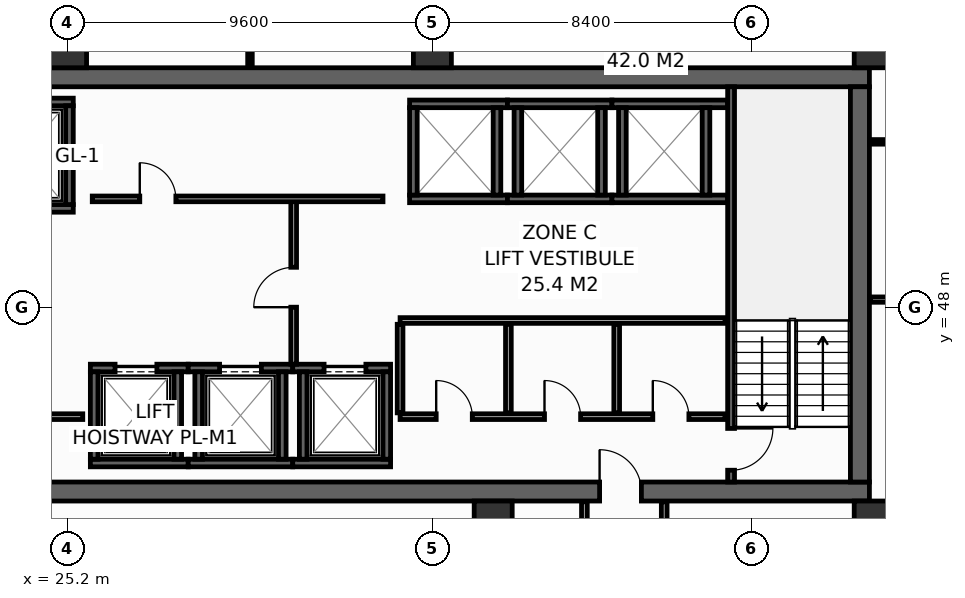
"""IFC4 building model, lengths in metres.
Left out: names, types, materials, properties, quantities, classifications, styles, units other than length and angle.
Written with IfcOpenShell. Run it as: python <this file> out.ifc"""

import sys

from ifc_helpers import new_model, si_unit, direction, frame, frame_2d, origin, origin_2d, place, context, subcontext, project, spatial, rectangle, hollow_rectangle, extrude, element, fill, save


model = new_model("IFC4")
c1 = context("Model", 3, precision=1e-05, world=origin(), true_north=direction((0.0, 1.0)))
c2 = subcontext(c1, "Body", "Model", "MODEL_VIEW")
j1 = project(units=[si_unit("LENGTHUNIT", "METRE"), si_unit("PLANEANGLEUNIT", "RADIAN")], contexts=[c1])
p1 = place(None, origin())
s1 = spatial("IfcSite", under=j1, at=p1, CompositionType="ELEMENT")
p2 = place(p1, origin())
s2 = spatial("IfcBuilding", under=s1, at=p2, CompositionType="ELEMENT")
p3 = place(p2, frame((0.0, 0.0, 175.2)))
s3 = spatial("IfcBuildingStorey", under=s2, at=p3, CompositionType="ELEMENT", Elevation=175.2)
p4 = place(p3, frame((13.6, 43.15, 0.0), z_axis=(0.0, 0.0, 1.0), x_axis=(1.0, 0.0, 0.0)))
e1 = element("IfcWall", 1, at=p4, inside=s3, PredefinedType="SHEAR", context=c2, shape_type="SweptSolid", body=[
    extrude(rectangle(XDim=32.7, YDim=0.5, at=frame_2d((16.35, 0.0))), origin(), (0.0, 0.0, 1.0), 3.55),
])
p5 = place(p4, frame((5.4, 0.0, 0.0)))
e2 = element("IfcOpeningElement", 2, at=p5, cuts=e1, PredefinedType="OPENING", context=c2, shape_type="SweptSolid", body=[
    extrude(rectangle(XDim=1.1, YDim=2.15, at=frame_2d((0.55, 1.075))), frame((0.0, 0.26, 0.0), z_axis=(0.0, -1.0, 0.0), x_axis=(1.0, 0.0, 0.0)), (0.0, 0.0, 1.0), 0.52),
])
p6 = place(p4, frame((25.6, 0.0, 0.0)))
e3 = element("IfcOpeningElement", 3, at=p6, cuts=e1, PredefinedType="OPENING", context=c2, shape_type="SweptSolid", body=[
    extrude(rectangle(XDim=1.1, YDim=2.15, at=frame_2d((0.55, 1.075))), frame((0.0, 0.26, 0.0), z_axis=(0.0, -1.0, 0.0), x_axis=(1.0, 0.0, 0.0)), (0.0, 0.0, 1.0), 0.52),
])
p7 = place(p3, frame((13.6, 54.05, 0.0), z_axis=(0.0, 0.0, 1.0), x_axis=(1.0, 0.0, 0.0)))
e4 = element("IfcWall", 4, at=p7, inside=s3, PredefinedType="SHEAR", context=c2, shape_type="SweptSolid", body=[
    extrude(rectangle(XDim=32.7, YDim=0.5, at=frame_2d((16.35, 0.0))), origin(), (0.0, 0.0, 1.0), 3.55),
])
p8 = place(p3, frame((46.05, 43.4, 0.0), z_axis=(0.0, 0.0, 1.0), x_axis=(0.0, 1.0, 0.0)))
e5 = element("IfcWall", 5, at=p8, inside=s3, PredefinedType="SHEAR", context=c2, shape_type="SweptSolid", body=[
    extrude(rectangle(XDim=10.4, YDim=0.5, at=frame_2d((5.2, 0.0))), origin(), (0.0, 0.0, 1.0), 3.55),
])
for number, where, z_axis, x_axis in (
    (6, (25.2, 54.8, 0.0), (0.0, 0.0, 1.0), (1.0, 0.0, 0.0)),
    (7, (34.8, 54.8, 0.0), (0.0, 0.0, 1.0), (1.0, 0.0, 0.0)),
    (8, (46.4, 54.8, 0.0), (0.0, 0.0, 1.0), (1.0, 0.0, 0.0)),
    (9, (36.4, 42.4, 0.0), (0.0, 0.0, 1.0), (1.0, 0.0, 0.0)),
    (10, (46.4, 42.4, 0.0), (0.0, 0.0, 1.0), (1.0, 0.0, 0.0)),
):
    element("IfcColumn", number, at=place(p3, frame(where, z_axis=z_axis, x_axis=x_axis)), inside=s3, PredefinedType="COLUMN", context=c2, shape_type="SweptSolid", body=[
        extrude(hollow_rectangle(XDim=1.0, YDim=1.0, WallThickness=0.045, at=origin_2d()), origin(), (0.0, 0.0, 1.0), 3.8),
    ])
p9 = place(p3, frame((22.5, 50.6, 0.0), z_axis=(0.0, 0.0, 1.0), x_axis=(1.0, 0.0, 0.0)))
e11 = element("IfcWall", 11, at=p9, inside=s3, PredefinedType="SHEAR", context=c2, shape_type="SweptSolid", body=[
    extrude(rectangle(XDim=2.85, YDim=0.2, at=frame_2d((1.425, 0.0))), origin(), (0.0, 0.0, 1.0), 3.55),
])
p10 = place(p9, frame((0.925, 0.0, 0.0)))
e12 = element("IfcOpeningElement", 12, at=p10, cuts=e11, PredefinedType="OPENING", context=c2, shape_type="SweptSolid", body=[
    extrude(rectangle(XDim=1.25, YDim=2.3, at=frame_2d((0.625, 1.15))), frame((0.0, 0.11, 0.0), z_axis=(0.0, -1.0, 0.0), x_axis=(1.0, 0.0, 0.0)), (0.0, 0.0, 1.0), 0.22),
])
p11 = place(p3, frame((22.5, 53.4, 0.0), z_axis=(0.0, 0.0, 1.0), x_axis=(1.0, 0.0, 0.0)))
e13 = element("IfcWall", 13, at=p11, inside=s3, PredefinedType="SHEAR", context=c2, shape_type="SweptSolid", body=[
    extrude(rectangle(XDim=2.85, YDim=0.2, at=frame_2d((1.425, 0.0))), origin(), (0.0, 0.0, 1.0), 3.55),
])
p12 = place(p3, frame((25.25, 50.7, 0.0), z_axis=(0.0, 0.0, 1.0), x_axis=(0.0, 1.0, 0.0)))
e14 = element("IfcWall", 14, at=p12, inside=s3, PredefinedType="SHEAR", context=c2, shape_type="SweptSolid", body=[
    extrude(rectangle(XDim=2.6, YDim=0.2, at=frame_2d((1.3, 0.0))), origin(), (0.0, 0.0, 1.0), 3.55),
])
p13 = place(p3, frame((25.8, 43.9, 0.0), z_axis=(0.0, 0.0, 1.0), x_axis=(1.0, 0.0, 0.0)))
e15 = element("IfcWall", 15, at=p13, inside=s3, PredefinedType="SHEAR", context=c2, shape_type="SweptSolid", body=[
    extrude(rectangle(XDim=2.575, YDim=0.2, at=frame_2d((1.288, 0.0))), origin(), (0.0, 0.0, 1.0), 3.55),
])
p14 = place(p3, frame((25.8, 46.4, 0.0), z_axis=(0.0, 0.0, 1.0), x_axis=(1.0, 0.0, 0.0)))
e16 = element("IfcWall", 16, at=p14, inside=s3, PredefinedType="SHEAR", context=c2, shape_type="SweptSolid", body=[
    extrude(rectangle(XDim=2.575, YDim=0.2, at=frame_2d((1.288, 0.0))), origin(), (0.0, 0.0, 1.0), 3.55),
])
p15 = place(p14, frame((0.65, 0.0, 0.0)))
e17 = element("IfcOpeningElement", 17, at=p15, cuts=e16, PredefinedType="OPENING", context=c2, shape_type="SweptSolid", body=[
    extrude(rectangle(XDim=1.1, YDim=2.2, at=frame_2d((0.55, 1.1))), frame((0.0, 0.11, 0.0), z_axis=(0.0, -1.0, 0.0), x_axis=(1.0, 0.0, 0.0)), (0.0, 0.0, 1.0), 0.22),
])
for number, where, z_axis, x_axis in (
    (18, (25.9, 44.0, 0.0), (0.0, 0.0, 1.0), (0.0, 1.0, 0.0)),
    (19, (28.1, 44.0, 0.0), (0.0, 0.0, 1.0), (0.0, 1.0, 0.0)),
):
    element("IfcWall", number, at=place(p3, frame(where, z_axis=z_axis, x_axis=x_axis)), inside=s3, PredefinedType="SHEAR", context=c2, shape_type="SweptSolid", body=[
        extrude(rectangle(XDim=2.3, YDim=0.2, at=frame_2d((1.15, 0.0))), origin(), (0.0, 0.0, 1.0), 3.55),
    ])
p16 = place(p3, frame((28.375, 43.9, 0.0), z_axis=(0.0, 0.0, 1.0), x_axis=(1.0, 0.0, 0.0)))
e20 = element("IfcWall", 20, at=p16, inside=s3, PredefinedType="SHEAR", context=c2, shape_type="SweptSolid", body=[
    extrude(rectangle(XDim=2.75, YDim=0.2, at=frame_2d((1.375, 0.0))), origin(), (0.0, 0.0, 1.0), 3.55),
])
p17 = place(p3, frame((28.375, 46.4, 0.0), z_axis=(0.0, 0.0, 1.0), x_axis=(1.0, 0.0, 0.0)))
e21 = element("IfcWall", 21, at=p17, inside=s3, PredefinedType="SHEAR", context=c2, shape_type="SweptSolid", body=[
    extrude(rectangle(XDim=2.75, YDim=0.2, at=frame_2d((1.375, 0.0))), origin(), (0.0, 0.0, 1.0), 3.55),
])
p18 = place(p17, frame((0.825, 0.0, 0.0)))
e22 = element("IfcOpeningElement", 22, at=p18, cuts=e21, PredefinedType="OPENING", context=c2, shape_type="SweptSolid", body=[
    extrude(rectangle(XDim=1.1, YDim=2.2, at=frame_2d((0.55, 1.1))), frame((0.0, 0.11, 0.0), z_axis=(0.0, -1.0, 0.0), x_axis=(1.0, 0.0, 0.0)), (0.0, 0.0, 1.0), 0.22),
])
for number, where, z_axis, x_axis in (
    (23, (28.65, 44.0, 0.0), (0.0, 0.0, 1.0), (0.0, 1.0, 0.0)),
    (24, (30.85, 44.0, 0.0), (0.0, 0.0, 1.0), (0.0, 1.0, 0.0)),
):
    element("IfcWall", number, at=place(p3, frame(where, z_axis=z_axis, x_axis=x_axis)), inside=s3, PredefinedType="SHEAR", context=c2, shape_type="SweptSolid", body=[
        extrude(rectangle(XDim=2.3, YDim=0.2, at=frame_2d((1.15, 0.0))), origin(), (0.0, 0.0, 1.0), 3.55),
    ])
p19 = place(p3, frame((31.125, 43.9, 0.0), z_axis=(0.0, 0.0, 1.0), x_axis=(1.0, 0.0, 0.0)))
e25 = element("IfcWall", 25, at=p19, inside=s3, PredefinedType="SHEAR", context=c2, shape_type="SweptSolid", body=[
    extrude(rectangle(XDim=2.575, YDim=0.2, at=frame_2d((1.288, 0.0))), origin(), (0.0, 0.0, 1.0), 3.55),
])
p20 = place(p3, frame((31.125, 46.4, 0.0), z_axis=(0.0, 0.0, 1.0), x_axis=(1.0, 0.0, 0.0)))
e26 = element("IfcWall", 26, at=p20, inside=s3, PredefinedType="SHEAR", context=c2, shape_type="SweptSolid", body=[
    extrude(rectangle(XDim=2.575, YDim=0.2, at=frame_2d((1.288, 0.0))), origin(), (0.0, 0.0, 1.0), 3.55),
])
p21 = place(p20, frame((0.825, 0.0, 0.0)))
e27 = element("IfcOpeningElement", 27, at=p21, cuts=e26, PredefinedType="OPENING", context=c2, shape_type="SweptSolid", body=[
    extrude(rectangle(XDim=1.1, YDim=2.2, at=frame_2d((0.55, 1.1))), frame((0.0, 0.11, 0.0), z_axis=(0.0, -1.0, 0.0), x_axis=(1.0, 0.0, 0.0)), (0.0, 0.0, 1.0), 0.22),
])
for number, where, z_axis, x_axis in (
    (28, (31.4, 44.0, 0.0), (0.0, 0.0, 1.0), (0.0, 1.0, 0.0)),
    (29, (33.6, 44.0, 0.0), (0.0, 0.0, 1.0), (0.0, 1.0, 0.0)),
):
    element("IfcWall", number, at=place(p3, frame(where, z_axis=z_axis, x_axis=x_axis)), inside=s3, PredefinedType="SHEAR", context=c2, shape_type="SweptSolid", body=[
        extrude(rectangle(XDim=2.3, YDim=0.2, at=frame_2d((1.15, 0.0))), origin(), (0.0, 0.0, 1.0), 3.55),
    ])
for number, where, z_axis, x_axis in (
    (30, (34.2, 50.85, 0.0), (0.0, 0.0, 1.0), (1.0, 0.0, 0.0)),
    (31, (34.2, 53.35, 0.0), (0.0, 0.0, 1.0), (1.0, 0.0, 0.0)),
):
    element("IfcWall", number, at=place(p3, frame(where, z_axis=z_axis, x_axis=x_axis)), inside=s3, PredefinedType="SHEAR", context=c2, shape_type="SweptSolid", body=[
        extrude(rectangle(XDim=2.575, YDim=0.2, at=frame_2d((1.288, 0.0))), origin(), (0.0, 0.0, 1.0), 3.55),
    ])
for number, where, z_axis, x_axis in (
    (32, (34.3, 50.95, 0.0), (0.0, 0.0, 1.0), (0.0, 1.0, 0.0)),
    (33, (36.5, 50.95, 0.0), (0.0, 0.0, 1.0), (0.0, 1.0, 0.0)),
):
    element("IfcWall", number, at=place(p3, frame(where, z_axis=z_axis, x_axis=x_axis)), inside=s3, PredefinedType="SHEAR", context=c2, shape_type="SweptSolid", body=[
        extrude(rectangle(XDim=2.3, YDim=0.2, at=frame_2d((1.15, 0.0))), origin(), (0.0, 0.0, 1.0), 3.55),
    ])
for number, where, z_axis, x_axis in (
    (34, (36.775, 50.85, 0.0), (0.0, 0.0, 1.0), (1.0, 0.0, 0.0)),
    (35, (36.775, 53.35, 0.0), (0.0, 0.0, 1.0), (1.0, 0.0, 0.0)),
):
    element("IfcWall", number, at=place(p3, frame(where, z_axis=z_axis, x_axis=x_axis)), inside=s3, PredefinedType="SHEAR", context=c2, shape_type="SweptSolid", body=[
        extrude(rectangle(XDim=2.75, YDim=0.2, at=frame_2d((1.375, 0.0))), origin(), (0.0, 0.0, 1.0), 3.55),
    ])
for number, where, z_axis, x_axis in (
    (36, (37.05, 50.95, 0.0), (0.0, 0.0, 1.0), (0.0, 1.0, 0.0)),
    (37, (39.25, 50.95, 0.0), (0.0, 0.0, 1.0), (0.0, 1.0, 0.0)),
):
    element("IfcWall", number, at=place(p3, frame(where, z_axis=z_axis, x_axis=x_axis)), inside=s3, PredefinedType="SHEAR", context=c2, shape_type="SweptSolid", body=[
        extrude(rectangle(XDim=2.3, YDim=0.2, at=frame_2d((1.15, 0.0))), origin(), (0.0, 0.0, 1.0), 3.55),
    ])
for number, where, z_axis, x_axis in (
    (38, (39.525, 50.85, 0.0), (0.0, 0.0, 1.0), (1.0, 0.0, 0.0)),
    (39, (39.525, 53.35, 0.0), (0.0, 0.0, 1.0), (1.0, 0.0, 0.0)),
):
    element("IfcWall", number, at=place(p3, frame(where, z_axis=z_axis, x_axis=x_axis)), inside=s3, PredefinedType="SHEAR", context=c2, shape_type="SweptSolid", body=[
        extrude(rectangle(XDim=3.045, YDim=0.2, at=frame_2d((1.522, 0.0))), origin(), (0.0, 0.0, 1.0), 3.55),
    ])
for number, where, z_axis, x_axis in (
    (40, (39.8, 50.95, 0.0), (0.0, 0.0, 1.0), (0.0, 1.0, 0.0)),
    (41, (42.0, 50.95, 0.0), (0.0, 0.0, 1.0), (0.0, 1.0, 0.0)),
):
    element("IfcWall", number, at=place(p3, frame(where, z_axis=z_axis, x_axis=x_axis)), inside=s3, PredefinedType="SHEAR", context=c2, shape_type="SweptSolid", body=[
        extrude(rectangle(XDim=2.3, YDim=0.2, at=frame_2d((1.15, 0.0))), origin(), (0.0, 0.0, 1.0), 3.55),
    ])
p22 = place(p3, frame((42.66, 53.8, 0.0), z_axis=(0.0, 0.0, 1.0), x_axis=(0.0, -1.0, 0.0)))
e42 = element("IfcWall", 42, at=p22, inside=s3, PredefinedType="SHEAR", context=c2, shape_type="SweptSolid", body=[
    extrude(rectangle(XDim=10.4, YDim=0.18, at=frame_2d((5.2, 0.0))), origin(), (0.0, 0.0, 1.0), 3.55),
])
p23 = place(p22, frame((8.99, 0.0, 0.0)))
e43 = element("IfcOpeningElement", 43, at=p23, cuts=e42, PredefinedType="OPENING", context=c2, shape_type="SweptSolid", body=[
    extrude(rectangle(XDim=1.1, YDim=2.15, at=frame_2d((0.55, 1.075))), frame((0.0, 0.1, 0.0), z_axis=(0.0, -1.0, 0.0), x_axis=(1.0, 0.0, 0.0)), (0.0, 0.0, 1.0), 0.2),
])
p24 = place(p3, frame((22.68, 45.12, 0.0), z_axis=(0.0, 0.0, 1.0), x_axis=(1.0, 0.0, 0.0)))
e44 = element("IfcWall", 44, at=p24, inside=s3, PredefinedType="PARTITIONING", context=c2, shape_type="SweptSolid", body=[
    extrude(rectangle(XDim=2.92, YDim=0.15, at=frame_2d((1.46, 0.0))), origin(), (0.0, 0.0, 1.0), 3.55),
])
p25 = place(p24, frame((0.85, 0.0, 0.0)))
e45 = element("IfcOpeningElement", 45, at=p25, cuts=e44, PredefinedType="OPENING", context=c2, shape_type="SweptSolid", body=[
    extrude(rectangle(XDim=1.1, YDim=2.15, at=frame_2d((0.55, 1.075))), frame((0.0, 0.085, 0.0), z_axis=(0.0, -1.0, 0.0), x_axis=(1.0, 0.0, 0.0)), (0.0, 0.0, 1.0), 0.17),
])
p26 = place(p3, frame((31.15, 46.5, 0.0), z_axis=(0.0, 0.0, 1.0), x_axis=(0.0, 1.0, 0.0)))
e46 = element("IfcWall", 46, at=p26, inside=s3, PredefinedType="PARTITIONING", context=c2, shape_type="SweptSolid", body=[
    extrude(rectangle(XDim=4.35, YDim=0.15, at=frame_2d((2.175, 0.0))), origin(), (0.0, 0.0, 1.0), 3.55),
])
p27 = place(p26, frame((1.5, 0.0, 0.0)))
e47 = element("IfcOpeningElement", 47, at=p27, cuts=e46, PredefinedType="OPENING", context=c2, shape_type="SweptSolid", body=[
    extrude(rectangle(XDim=1.05, YDim=2.15, at=frame_2d((0.525, 1.075))), frame((0.0, 0.085, 0.0), z_axis=(0.0, -1.0, 0.0), x_axis=(1.0, 0.0, 0.0)), (0.0, 0.0, 1.0), 0.17),
])
p28 = place(p3, frame((33.95, 45.12, 0.0), z_axis=(0.0, 0.0, 1.0), x_axis=(1.0, 0.0, 0.0)))
e48 = element("IfcWall", 48, at=p28, inside=s3, PredefinedType="PARTITIONING", context=c2, shape_type="SweptSolid", body=[
    extrude(rectangle(XDim=8.55, YDim=0.15, at=frame_2d((4.275, 0.0))), origin(), (0.0, 0.0, 1.0), 3.55),
])
p29 = place(p28, frame((0.95, 0.0, 0.0)))
e49 = element("IfcOpeningElement", 49, at=p29, cuts=e48, PredefinedType="OPENING", context=c2, shape_type="SweptSolid", body=[
    extrude(rectangle(XDim=0.95, YDim=2.15, at=frame_2d((0.475, 1.075))), frame((0.0, 0.085, 0.0), z_axis=(0.0, -1.0, 0.0), x_axis=(1.0, 0.0, 0.0)), (0.0, 0.0, 1.0), 0.17),
])
p30 = place(p28, frame((3.8, 0.0, 0.0)))
e50 = element("IfcOpeningElement", 50, at=p30, cuts=e48, PredefinedType="OPENING", context=c2, shape_type="SweptSolid", body=[
    extrude(rectangle(XDim=0.95, YDim=2.15, at=frame_2d((0.475, 1.075))), frame((0.0, 0.085, 0.0), z_axis=(0.0, -1.0, 0.0), x_axis=(1.0, 0.0, 0.0)), (0.0, 0.0, 1.0), 0.17),
])
p31 = place(p28, frame((6.65, 0.0, 0.0)))
e51 = element("IfcOpeningElement", 51, at=p31, cuts=e48, PredefinedType="OPENING", context=c2, shape_type="SweptSolid", body=[
    extrude(rectangle(XDim=0.95, YDim=2.15, at=frame_2d((0.475, 1.075))), frame((0.0, 0.085, 0.0), z_axis=(0.0, -1.0, 0.0), x_axis=(1.0, 0.0, 0.0)), (0.0, 0.0, 1.0), 0.17),
])
p32 = place(p3, frame((33.95, 47.65, 0.0), z_axis=(0.0, 0.0, 1.0), x_axis=(1.0, 0.0, 0.0)))
e52 = element("IfcWall", 52, at=p32, inside=s3, PredefinedType="PARTITIONING", context=c2, shape_type="SweptSolid", body=[
    extrude(rectangle(XDim=8.55, YDim=0.15, at=frame_2d((4.275, 0.0))), origin(), (0.0, 0.0, 1.0), 3.55),
])
for number, where, z_axis, x_axis in (
    (53, (33.95, 45.22, 0.0), (0.0, 0.0, 1.0), (0.0, 1.0, 0.0)),
    (54, (36.8, 45.22, 0.0), (0.0, 0.0, 1.0), (0.0, 1.0, 0.0)),
    (55, (39.65, 45.22, 0.0), (0.0, 0.0, 1.0), (0.0, 1.0, 0.0)),
):
    element("IfcWall", number, at=place(p3, frame(where, z_axis=z_axis, x_axis=x_axis)), inside=s3, PredefinedType="PARTITIONING", context=c2, shape_type="SweptSolid", body=[
        extrude(rectangle(XDim=2.33, YDim=0.15, at=frame_2d((1.165, 0.0))), origin(), (0.0, 0.0, 1.0), 3.55),
    ])
p33 = place(p3, frame((25.85, 50.85, 0.0), z_axis=(0.0, 0.0, 1.0), x_axis=(1.0, 0.0, 0.0)))
e56 = element("IfcWall", 56, at=p33, inside=s3, PredefinedType="PARTITIONING", context=c2, shape_type="SweptSolid", body=[
    extrude(rectangle(XDim=7.65, YDim=0.15, at=frame_2d((3.825, 0.0))), origin(), (0.0, 0.0, 1.0), 3.55),
])
p34 = place(p33, frame((1.25, 0.0, 0.0)))
e57 = element("IfcOpeningElement", 57, at=p34, cuts=e56, PredefinedType="OPENING", context=c2, shape_type="SweptSolid", body=[
    extrude(rectangle(XDim=0.95, YDim=2.15, at=frame_2d((0.475, 1.075))), frame((0.0, 0.085, 0.0), z_axis=(0.0, -1.0, 0.0), x_axis=(1.0, 0.0, 0.0)), (0.0, 0.0, 1.0), 0.17),
])
p35 = place(p3, frame((46.15, 40.84, 0.0), z_axis=(0.0, 0.0, 1.0), x_axis=(0.0, 1.0, 0.0)))
e58 = element("IfcWall", 58, at=p35, inside=s3, PredefinedType="PARTITIONING", context=c2, shape_type="SweptSolid", body=[
    extrude(rectangle(XDim=2.04, YDim=0.14, at=frame_2d((1.02, 0.0))), origin(), (0.0, 0.0, 1.0), 3.55),
])
p36 = place(p3, frame((46.32, 48.2, 0.0), z_axis=(0.0, 0.0, 1.0), x_axis=(1.0, 0.0, 0.0)))
e59 = element("IfcWall", 59, at=p36, inside=s3, PredefinedType="PARTITIONING", context=c2, shape_type="SweptSolid", body=[
    extrude(rectangle(XDim=3.88, YDim=0.14, at=frame_2d((1.94, 0.0))), origin(), (0.0, 0.0, 1.0), 3.55),
])
p37 = place(p3, frame((46.32, 52.35, 0.0), z_axis=(0.0, 0.0, 1.0), x_axis=(1.0, 0.0, 0.0)))
e60 = element("IfcWall", 60, at=p37, inside=s3, PredefinedType="PARTITIONING", context=c2, shape_type="SweptSolid", body=[
    extrude(rectangle(XDim=3.88, YDim=0.12, at=frame_2d((1.94, 0.0))), origin(), (0.0, 0.0, 1.0), 3.55),
])
p38 = place(p3, frame((30.0, 54.32, 0.0), z_axis=(0.0, 0.0, 1.0), x_axis=(0.0, 1.0, 0.0)))
e61 = element("IfcWall", 61, at=p38, inside=s3, PredefinedType="PARTITIONING", context=c2, shape_type="SweptSolid", body=[
    extrude(rectangle(XDim=1.675, YDim=0.12, at=frame_2d((0.837, 0.0))), origin(), (0.0, 0.0, 1.0), 2.935),
])
for number, where, z_axis, x_axis in (
    (62, (38.8, 40.75, 0.0), (0.0, 0.0, 1.0), (0.0, 1.0, 0.0)),
    (63, (40.9, 40.75, 0.0), (0.0, 0.0, 1.0), (0.0, 1.0, 0.0)),
):
    element("IfcWall", number, at=place(p3, frame(where, z_axis=z_axis, x_axis=x_axis)), inside=s3, PredefinedType="PARTITIONING", context=c2, shape_type="SweptSolid", body=[
        extrude(rectangle(XDim=2.13, YDim=0.15, at=frame_2d((1.065, 0.0))), origin(), (0.0, 0.0, 1.0), 3.55),
    ])
p39 = place(p15, origin())
e64 = element("IfcDoor", 64, at=p39, inside=s3, OperationType="SLIDING_TO_LEFT", PredefinedType="DOOR", context=c2, shape_type="SweptSolid", body=[
    extrude(rectangle(XDim=1.1, YDim=2.2, at=frame_2d((0.55, 1.1))), frame((0.0, 0.025, 0.0), z_axis=(0.0, -1.0, 0.0), x_axis=(1.0, 0.0, 0.0)), (0.0, 0.0, 1.0), 0.05),
])
fill(e17, e64)
p40 = place(p18, origin())
e65 = element("IfcDoor", 65, at=p40, inside=s3, OperationType="SLIDING_TO_LEFT", PredefinedType="DOOR", context=c2, shape_type="SweptSolid", body=[
    extrude(rectangle(XDim=1.1, YDim=2.2, at=frame_2d((0.55, 1.1))), frame((0.0, 0.025, 0.0), z_axis=(0.0, -1.0, 0.0), x_axis=(1.0, 0.0, 0.0)), (0.0, 0.0, 1.0), 0.05),
])
fill(e22, e65)
p41 = place(p21, origin())
e66 = element("IfcDoor", 66, at=p41, inside=s3, OperationType="SLIDING_TO_LEFT", PredefinedType="DOOR", context=c2, shape_type="SweptSolid", body=[
    extrude(rectangle(XDim=1.1, YDim=2.2, at=frame_2d((0.55, 1.1))), frame((0.0, 0.025, 0.0), z_axis=(0.0, -1.0, 0.0), x_axis=(1.0, 0.0, 0.0)), (0.0, 0.0, 1.0), 0.05),
])
fill(e27, e66)
p42 = place(p23, origin())
e67 = element("IfcDoor", 67, at=p42, inside=s3, OperationType="SINGLE_SWING_LEFT", PredefinedType="DOOR", context=c2, shape_type="SweptSolid", body=[
    extrude(rectangle(XDim=1.1, YDim=2.15, at=frame_2d((0.55, 1.075))), frame((0.0, 0.025, 0.0), z_axis=(0.0, -1.0, 0.0), x_axis=(1.0, 0.0, 0.0)), (0.0, 0.0, 1.0), 0.05),
])
fill(e43, e67)
p43 = place(p6, origin())
e68 = element("IfcDoor", 68, at=p43, inside=s3, OperationType="SINGLE_SWING_LEFT", PredefinedType="DOOR", context=c2, shape_type="SweptSolid", body=[
    extrude(rectangle(XDim=1.1, YDim=2.15, at=frame_2d((0.55, 1.075))), frame((0.0, 0.025, 0.0), z_axis=(0.0, -1.0, 0.0), x_axis=(1.0, 0.0, 0.0)), (0.0, 0.0, 1.0), 0.05),
])
fill(e3, e68)
p44 = place(p27, origin())
e69 = element("IfcDoor", 69, at=p44, inside=s3, OperationType="SINGLE_SWING_LEFT", PredefinedType="DOOR", context=c2, shape_type="SweptSolid", body=[
    extrude(rectangle(XDim=1.05, YDim=2.15, at=frame_2d((0.525, 1.075))), frame((0.0, 0.025, 0.0), z_axis=(0.0, -1.0, 0.0), x_axis=(1.0, 0.0, 0.0)), (0.0, 0.0, 1.0), 0.05),
])
fill(e47, e69)
p45 = place(p29, origin())
e70 = element("IfcDoor", 70, at=p45, inside=s3, OperationType="SINGLE_SWING_LEFT", PredefinedType="DOOR", context=c2, shape_type="SweptSolid", body=[
    extrude(rectangle(XDim=0.95, YDim=2.15, at=frame_2d((0.475, 1.075))), frame((0.0, 0.025, 0.0), z_axis=(0.0, -1.0, 0.0), x_axis=(1.0, 0.0, 0.0)), (0.0, 0.0, 1.0), 0.05),
])
fill(e49, e70)
p46 = place(p30, origin())
e71 = element("IfcDoor", 71, at=p46, inside=s3, OperationType="SINGLE_SWING_LEFT", PredefinedType="DOOR", context=c2, shape_type="SweptSolid", body=[
    extrude(rectangle(XDim=0.95, YDim=2.15, at=frame_2d((0.475, 1.075))), frame((0.0, 0.025, 0.0), z_axis=(0.0, -1.0, 0.0), x_axis=(1.0, 0.0, 0.0)), (0.0, 0.0, 1.0), 0.05),
])
fill(e50, e71)
p47 = place(p31, origin())
e72 = element("IfcDoor", 72, at=p47, inside=s3, OperationType="SINGLE_SWING_LEFT", PredefinedType="DOOR", context=c2, shape_type="SweptSolid", body=[
    extrude(rectangle(XDim=0.95, YDim=2.15, at=frame_2d((0.475, 1.075))), frame((0.0, 0.025, 0.0), z_axis=(0.0, -1.0, 0.0), x_axis=(1.0, 0.0, 0.0)), (0.0, 0.0, 1.0), 0.05),
])
fill(e51, e72)
p48 = place(p34, origin())
e73 = element("IfcDoor", 73, at=p48, inside=s3, OperationType="SINGLE_SWING_LEFT", PredefinedType="DOOR", context=c2, shape_type="SweptSolid", body=[
    extrude(rectangle(XDim=0.95, YDim=2.15, at=frame_2d((0.475, 1.075))), frame((0.0, 0.025, 0.0), z_axis=(0.0, -1.0, 0.0), x_axis=(1.0, 0.0, 0.0)), (0.0, 0.0, 1.0), 0.05),
])
fill(e57, e73)
save(model, sys.argv[1])
